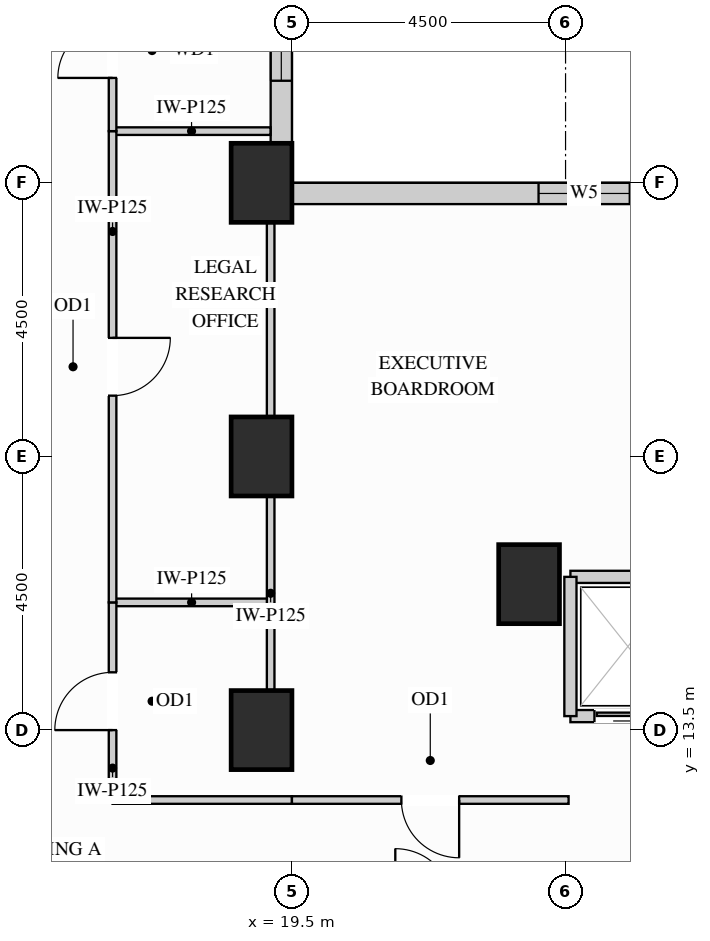
"""IFC4 building model, lengths in metres.
Left out: names, types, materials, properties, quantities, classifications, styles, units other than length and angle.
Written with IfcOpenShell. Run it as: python <this file> out.ifc"""

import sys

from ifc_helpers import new_model, si_unit, direction, frame, frame_2d, origin, origin_2d, place, context, subcontext, project, spatial, rectangle, extrude, source, transform, mapped, element, fill, save


model = new_model("IFC4")
c1 = context("Model", 3, precision=1e-05, world=origin(), true_north=direction((0.0, 1.0)))
c2 = subcontext(c1, "Body", "Model", "MODEL_VIEW")
j1 = project(units=[si_unit("LENGTHUNIT", "METRE"), si_unit("PLANEANGLEUNIT", "RADIAN")], contexts=[c1])
p1 = place(None, origin())
s1 = spatial("IfcSite", under=j1, at=p1, CompositionType="ELEMENT")
p2 = place(p1, origin())
s2 = spatial("IfcBuilding", under=s1, at=p2, CompositionType="ELEMENT")
p3 = place(p2, frame((0.0, 0.0, 29.7)))
s3 = spatial("IfcBuildingStorey", under=s2, at=p3, CompositionType="ELEMENT", Elevation=29.7)
m1 = source(origin(), c2, "Body", "SweptSolid", [
    extrude(rectangle(XDim=1.0, YDim=1.3, at=origin_2d()), origin(), (0.0, 0.0, 1.0), 3.38),
])
for number, where, z_axis, x_axis in (
    (1, (19.0, 13.5, 0.0), (0.0, 0.0, 1.0), (1.0, 0.0, 0.0)),
    (2, (19.0, 18.0, 0.0), (0.0, 0.0, 1.0), (1.0, 0.0, 0.0)),
    (3, (19.0, 22.5, 0.0), (0.0, 0.0, 1.0), (1.0, 0.0, 0.0)),
    (4, (23.4, 15.9, 0.0), (0.0, 0.0, 1.0), (1.0, 0.0, 0.0)),
):
    element("IfcColumn", number, at=place(p3, frame(where, z_axis=z_axis, x_axis=x_axis)), inside=s3, PredefinedType="COLUMN", context=c2, shape_type="MappedRepresentation", body=[
        mapped(m1, transform((0.0, 0.0, 0.0), x_axis=(1.0, 0.0, 0.0), y_axis=(0.0, 1.0, 0.0), z_axis=(0.0, 0.0, 1.0))),
    ])
p4 = place(p3, frame((34.352, 22.325, 0.0), z_axis=(0.0, 0.0, 1.0), x_axis=(-1.0, 0.0, 0.0)))
e5 = element("IfcWall", 5, at=p4, inside=s3, PredefinedType="SOLIDWALL", context=c2, shape_type="SweptSolid", body=[
    extrude(rectangle(XDim=14.854, YDim=0.35, at=frame_2d((7.427, 0.0))), origin(), (0.0, 0.0, 1.0), 3.365),
])
p5 = place(p4, frame((4.058, 0.0, 0.78)))
e6 = element("IfcOpeningElement", 6, at=p5, cuts=e5, PredefinedType="OPENING", context=c2, shape_type="SweptSolid", body=[
    extrude(rectangle(XDim=1.5, YDim=2.0, at=frame_2d((0.75, 1.0))), frame((0.0, 0.185, 0.0), z_axis=(0.0, -1.0, 0.0), x_axis=(1.0, 0.0, 0.0)), (0.0, 0.0, 1.0), 0.37),
])
p6 = place(p4, frame((9.296, 0.0, 0.78)))
e7 = element("IfcOpeningElement", 7, at=p6, cuts=e5, PredefinedType="OPENING", context=c2, shape_type="SweptSolid", body=[
    extrude(rectangle(XDim=1.5, YDim=2.0, at=frame_2d((0.75, 1.0))), frame((0.0, 0.185, 0.0), z_axis=(0.0, -1.0, 0.0), x_axis=(1.0, 0.0, 0.0)), (0.0, 0.0, 1.0), 0.37),
])
p7 = place(p3, frame((19.325, 23.148, 0.0), z_axis=(0.0, 0.0, 1.0), x_axis=(0.0, 1.0, 0.0)))
e8 = element("IfcWall", 8, at=p7, inside=s3, PredefinedType="SOLIDWALL", context=c2, shape_type="SweptSolid", body=[
    extrude(rectangle(XDim=3.004, YDim=0.35, at=frame_2d((1.502, 0.0))), origin(), (0.0, 0.0, 1.0), 2.51),
])
p8 = place(p7, frame((1.031, 0.0, 0.78)))
e9 = element("IfcOpeningElement", 9, at=p8, cuts=e8, PredefinedType="OPENING", context=c2, shape_type="SweptSolid", body=[
    extrude(rectangle(XDim=1.5, YDim=1.55, at=frame_2d((0.75, 0.775))), frame((0.0, 0.185, 0.0), z_axis=(0.0, -1.0, 0.0), x_axis=(1.0, 0.0, 0.0)), (0.0, 0.0, 1.0), 0.37),
])
m2 = source(origin(), c2, "Body", "SweptSolid", [
    extrude(rectangle(XDim=2.6, YDim=0.125, at=frame_2d((1.3, 0.0))), origin(), (0.0, 0.0, 1.0), 3.365),
])
p9 = place(p3, frame((16.55, 15.6, 0.0), z_axis=(0.0, 0.0, 1.0), x_axis=(1.0, 0.0, 0.0)))
e10 = element("IfcWall", 10, at=p9, inside=s3, PredefinedType="PARTITIONING", context=c2, shape_type="MappedRepresentation", body=[
    mapped(m2, transform((0.0, 0.0, 0.0), x_axis=(1.0, 0.0, 0.0), y_axis=(0.0, 1.0, 0.0), z_axis=(0.0, 0.0, 1.0))),
])
m3 = source(origin(), c2, "Body", "SweptSolid", [
    extrude(rectangle(XDim=2.598, YDim=0.125, at=frame_2d((1.299, 0.0))), origin(), (0.0, 0.0, 1.0), 3.365),
])
p10 = place(p3, frame((16.55, 23.35, 0.0), z_axis=(0.0, 0.0, 1.0), x_axis=(1.0, 0.0, 0.0)))
e11 = element("IfcWall", 11, at=p10, inside=s3, PredefinedType="PARTITIONING", context=c2, shape_type="MappedRepresentation", body=[
    mapped(m3, transform((0.0, 0.0, 0.0), x_axis=(1.0, 0.0, 0.0), y_axis=(0.0, 1.0, 0.0), z_axis=(0.0, 0.0, 1.0))),
])
m4 = source(origin(), c2, "Body", "SweptSolid", [
    extrude(rectangle(XDim=3.18, YDim=0.125, at=frame_2d((1.59, 0.0))), origin(), (0.0, 0.0, 1.0), 2.67),
])
for number, where, z_axis, x_axis in (
    (12, (19.15, 14.16, 0.0), (0.0, 0.0, 1.0), (0.0, 1.0, 0.0)),
    (13, (19.15, 18.66, 0.0), (0.0, 0.0, 1.0), (0.0, 1.0, 0.0)),
):
    element("IfcWall", number, at=place(p3, frame(where, z_axis=z_axis, x_axis=x_axis)), inside=s3, PredefinedType="PARTITIONING", context=c2, shape_type="MappedRepresentation", body=[
        mapped(m4, transform((0.0, 0.0, 0.0), x_axis=(1.0, 0.0, 0.0), y_axis=(0.0, 1.0, 0.0), z_axis=(0.0, 0.0, 1.0))),
    ])
p11 = place(p3, frame((16.55, 12.35, 0.0), z_axis=(0.0, 0.0, 1.0), x_axis=(0.0, 1.0, 0.0)))
e14 = element("IfcWall", 14, at=p11, inside=s3, PredefinedType="PARTITIONING", context=c2, shape_type="SweptSolid", body=[
    extrude(rectangle(XDim=3.25, YDim=0.125, at=frame_2d((1.625, 0.0))), origin(), (0.0, 0.0, 1.0), 3.365),
])
p12 = place(p11, frame((1.15, 0.0, 0.0)))
e15 = element("IfcOpeningElement", 15, at=p12, cuts=e14, PredefinedType="OPENING", context=c2, shape_type="SweptSolid", body=[
    extrude(rectangle(XDim=0.95, YDim=2.15, at=frame_2d((0.475, 1.075))), frame((0.0, 0.073, 0.0), z_axis=(0.0, -1.0, 0.0), x_axis=(1.0, 0.0, 0.0)), (0.0, 0.0, 1.0), 0.145),
])
p13 = place(p3, frame((16.55, 15.6, 0.0), z_axis=(0.0, 0.0, 1.0), x_axis=(0.0, 1.0, 0.0)))
e16 = element("IfcWall", 16, at=p13, inside=s3, PredefinedType="PARTITIONING", context=c2, shape_type="SweptSolid", body=[
    extrude(rectangle(XDim=7.75, YDim=0.125, at=frame_2d((3.875, 0.0))), origin(), (0.0, 0.0, 1.0), 3.365),
])
p14 = place(p13, frame((3.4, 0.0, 0.0)))
e17 = element("IfcOpeningElement", 17, at=p14, cuts=e16, PredefinedType="OPENING", context=c2, shape_type="SweptSolid", body=[
    extrude(rectangle(XDim=0.95, YDim=2.15, at=frame_2d((0.475, 1.075))), frame((0.0, 0.073, 0.0), z_axis=(0.0, -1.0, 0.0), x_axis=(1.0, 0.0, 0.0)), (0.0, 0.0, 1.0), 0.145),
])
p15 = place(p3, frame((16.55, 23.35, 0.0), z_axis=(0.0, 0.0, 1.0), x_axis=(0.0, 1.0, 0.0)))
e18 = element("IfcWall", 18, at=p15, inside=s3, PredefinedType="PARTITIONING", context=c2, shape_type="SweptSolid", body=[
    extrude(rectangle(XDim=2.7, YDim=0.125, at=frame_2d((1.35, 0.0))), origin(), (0.0, 0.0, 1.0), 3.365),
])
p16 = place(p15, frame((0.875, 0.0, 0.0)))
e19 = element("IfcOpeningElement", 19, at=p16, cuts=e18, PredefinedType="OPENING", context=c2, shape_type="SweptSolid", body=[
    extrude(rectangle(XDim=0.9, YDim=2.15, at=frame_2d((0.45, 1.075))), frame((0.0, 0.073, 0.0), z_axis=(0.0, -1.0, 0.0), x_axis=(1.0, 0.0, 0.0)), (0.0, 0.0, 1.0), 0.145),
])
m5 = source(origin(), c2, "Body", "SweptSolid", [
    extrude(rectangle(XDim=2.95, YDim=0.125, at=frame_2d((1.475, 0.0))), origin(), (0.0, 0.0, 1.0), 3.365),
])
p17 = place(p3, frame((16.55, 12.35, 0.0), z_axis=(0.0, 0.0, 1.0), x_axis=(1.0, 0.0, 0.0)))
e20 = element("IfcWall", 20, at=p17, inside=s3, PredefinedType="PARTITIONING", context=c2, shape_type="MappedRepresentation", body=[
    mapped(m5, transform((0.0, 0.0, 0.0), x_axis=(1.0, 0.0, 0.0), y_axis=(0.0, 1.0, 0.0), z_axis=(0.0, 0.0, 1.0))),
])
p18 = place(p3, frame((19.5, 12.35, 0.0), z_axis=(0.0, 0.0, 1.0), x_axis=(1.0, 0.0, 0.0)))
e21 = element("IfcWall", 21, at=p18, inside=s3, PredefinedType="PARTITIONING", context=c2, shape_type="SweptSolid", body=[
    extrude(rectangle(XDim=4.55, YDim=0.125, at=frame_2d((2.275, 0.0))), origin(), (0.0, 0.0, 1.0), 3.365),
])
p19 = place(p18, frame((1.8, 0.0, 0.0)))
e22 = element("IfcOpeningElement", 22, at=p19, cuts=e21, PredefinedType="OPENING", context=c2, shape_type="SweptSolid", body=[
    extrude(rectangle(XDim=0.95, YDim=2.15, at=frame_2d((0.475, 1.075))), frame((0.0, 0.073, 0.0), z_axis=(0.0, -1.0, 0.0), x_axis=(1.0, 0.0, 0.0)), (0.0, 0.0, 1.0), 0.145),
])
m6 = source(origin(), c2, "Body", "SweptSolid", [
    extrude(rectangle(XDim=1.89, YDim=0.2, at=frame_2d((0.945, 0.0))), origin(), (0.0, 0.0, 1.0), 2.67),
])
p20 = place(p3, frame((24.08, 16.02, 0.0), z_axis=(0.0, 0.0, 1.0), x_axis=(1.0, 0.0, 0.0)))
e23 = element("IfcWall", 23, at=p20, inside=s3, PredefinedType="PARTITIONING", context=c2, shape_type="MappedRepresentation", body=[
    mapped(m6, transform((0.0, 0.0, 0.0), x_axis=(1.0, 0.0, 0.0), y_axis=(0.0, 1.0, 0.0), z_axis=(0.0, 0.0, 1.0))),
])
p21 = place(p3, frame((24.08, 13.73, 0.0), z_axis=(0.0, 0.0, 1.0), x_axis=(1.0, 0.0, 0.0)))
e24 = element("IfcWall", 24, at=p21, inside=s3, PredefinedType="PARTITIONING", context=c2, shape_type="SweptSolid", body=[
    extrude(rectangle(XDim=1.89, YDim=0.2, at=frame_2d((0.945, 0.0))), origin(), (0.0, 0.0, 1.0), 2.446),
])
p22 = place(p21, frame((0.395, 0.0, 0.0)))
e25 = element("IfcOpeningElement", 25, at=p22, cuts=e24, PredefinedType="OPENING", context=c2, shape_type="SweptSolid", body=[
    extrude(rectangle(XDim=1.1, YDim=2.2, at=frame_2d((0.55, 1.1))), frame((0.0, 0.11, 0.0), z_axis=(0.0, -1.0, 0.0), x_axis=(1.0, 0.0, 0.0)), (0.0, 0.0, 1.0), 0.22),
])
m7 = source(origin(), c2, "Body", "SweptSolid", [
    extrude(rectangle(XDim=2.29, YDim=0.2, at=frame_2d((1.145, 0.0))), origin(), (0.0, 0.0, 1.0), 3.365),
])
p23 = place(p3, frame((24.08, 13.73, 0.0), z_axis=(0.0, 0.0, 1.0), x_axis=(0.0, 1.0, 0.0)))
e26 = element("IfcWall", 26, at=p23, inside=s3, PredefinedType="PARTITIONING", context=c2, shape_type="MappedRepresentation", body=[
    mapped(m7, transform((0.0, 0.0, 0.0), x_axis=(1.0, 0.0, 0.0), y_axis=(0.0, 1.0, 0.0), z_axis=(0.0, 0.0, 1.0))),
])
m8 = source(origin(), c2, "Body", "SweptSolid", [
    extrude(rectangle(XDim=1.1, YDim=2.2, at=frame_2d((0.55, 1.1))), frame((0.0, 0.025, 0.0), z_axis=(0.0, -1.0, 0.0), x_axis=(1.0, 0.0, 0.0)), (0.0, 0.0, 1.0), 0.05),
])
p24 = place(p22, origin())
e27 = element("IfcDoor", 27, at=p24, inside=s3, OperationType="SLIDING_TO_LEFT", PredefinedType="DOOR", context=c2, shape_type="MappedRepresentation", body=[
    mapped(m8, transform((0.0, 0.0, 0.0), x_axis=(1.0, 0.0, 0.0), y_axis=(0.0, 1.0, 0.0), z_axis=(0.0, 0.0, 1.0))),
])
fill(e25, e27)
m9 = source(origin(), c2, "Body", "SweptSolid", [
    extrude(rectangle(XDim=0.95, YDim=2.15, at=frame_2d((0.475, 1.075))), frame((0.0, 0.025, 0.0), z_axis=(0.0, -1.0, 0.0), x_axis=(1.0, 0.0, 0.0)), (0.0, 0.0, 1.0), 0.05),
])
p25 = place(p12, origin())
e28 = element("IfcDoor", 28, at=p25, inside=s3, OperationType="SINGLE_SWING_LEFT", PredefinedType="DOOR", context=c2, shape_type="MappedRepresentation", body=[
    mapped(m9, transform((0.0, 0.0, 0.0), x_axis=(1.0, 0.0, 0.0), y_axis=(0.0, 1.0, 0.0), z_axis=(0.0, 0.0, 1.0))),
])
fill(e15, e28)
p26 = place(p14, origin())
e29 = element("IfcDoor", 29, at=p26, inside=s3, OperationType="SINGLE_SWING_RIGHT", PredefinedType="DOOR", context=c2, shape_type="MappedRepresentation", body=[
    mapped(m9, transform((0.0, 0.0, 0.0), x_axis=(1.0, 0.0, 0.0), y_axis=(0.0, 1.0, 0.0), z_axis=(0.0, 0.0, 1.0))),
])
fill(e17, e29)
p27 = place(p19, origin())
e30 = element("IfcDoor", 30, at=p27, inside=s3, OperationType="SINGLE_SWING_RIGHT", PredefinedType="DOOR", context=c2, shape_type="MappedRepresentation", body=[
    mapped(m9, transform((0.0, 0.0, 0.0), x_axis=(1.0, 0.0, 0.0), y_axis=(0.0, 1.0, 0.0), z_axis=(0.0, 0.0, 1.0))),
])
fill(e22, e30)
m10 = source(origin(), c2, "Body", "SweptSolid", [
    extrude(rectangle(XDim=0.9, YDim=2.15, at=frame_2d((0.45, 1.075))), frame((0.0, 0.025, 0.0), z_axis=(0.0, -1.0, 0.0), x_axis=(1.0, 0.0, 0.0)), (0.0, 0.0, 1.0), 0.05),
])
p28 = place(p16, origin())
e31 = element("IfcDoor", 31, at=p28, inside=s3, OperationType="SINGLE_SWING_LEFT", PredefinedType="DOOR", context=c2, shape_type="MappedRepresentation", body=[
    mapped(m10, transform((0.0, 0.0, 0.0), x_axis=(1.0, 0.0, 0.0), y_axis=(0.0, 1.0, 0.0), z_axis=(0.0, 0.0, 1.0))),
])
fill(e19, e31)
m11 = source(origin(), c2, "Body", "SweptSolid", [
    extrude(rectangle(XDim=1.5, YDim=2.0, at=frame_2d((0.75, 1.0))), frame((0.0, 0.03, 0.0), z_axis=(0.0, -1.0, 0.0), x_axis=(1.0, 0.0, 0.0)), (0.0, 0.0, 1.0), 0.06),
])
p29 = place(p6, origin())
e32 = element("IfcWindow", 32, at=p29, inside=s3, PartitioningType="SINGLE_PANEL", PredefinedType="WINDOW", context=c2, shape_type="MappedRepresentation", body=[
    mapped(m11, transform((0.0, 0.0, 0.0), x_axis=(1.0, 0.0, 0.0), y_axis=(0.0, 1.0, 0.0), z_axis=(0.0, 0.0, 1.0))),
])
fill(e7, e32)
m12 = source(origin(), c2, "Body", "SweptSolid", [
    extrude(rectangle(XDim=1.5, YDim=1.55, at=frame_2d((0.75, 0.775))), frame((0.0, 0.03, 0.0), z_axis=(0.0, -1.0, 0.0), x_axis=(1.0, 0.0, 0.0)), (0.0, 0.0, 1.0), 0.06),
])
p30 = place(p8, origin())
e33 = element("IfcWindow", 33, at=p30, inside=s3, PartitioningType="SINGLE_PANEL", PredefinedType="WINDOW", context=c2, shape_type="MappedRepresentation", body=[
    mapped(m12, transform((0.0, 0.0, 0.0), x_axis=(1.0, 0.0, 0.0), y_axis=(0.0, 1.0, 0.0), z_axis=(0.0, 0.0, 1.0))),
])
fill(e9, e33)
save(model, sys.argv[1])
